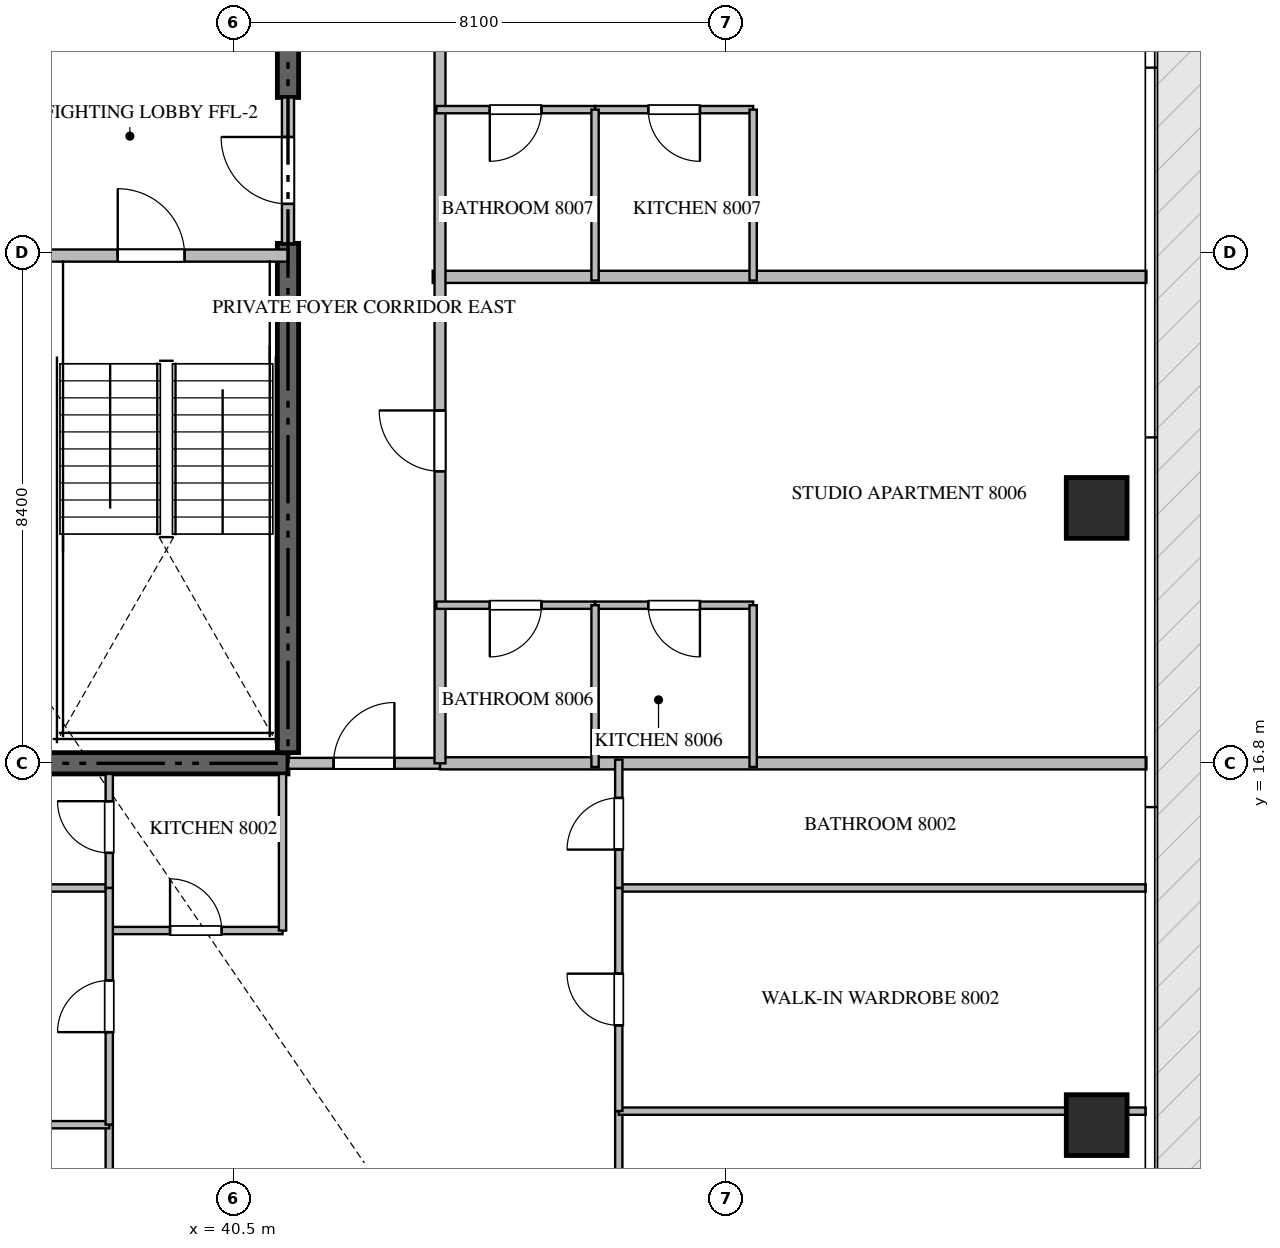
"""IFC4 building model, lengths in metres.
Left out: names, types, materials, properties, quantities, classifications, styles, units other than length and angle.
Written with IfcOpenShell. Run it as: python <this file> out.ifc"""

import sys

from ifc_helpers import new_model, si_unit, direction, frame, frame_2d, origin, origin_2d, place, context, subcontext, project, spatial, rectangle, extrude, source, transform, mapped, element, fill, save


model = new_model("IFC4")
c1 = context("Model", 3, precision=1e-05, world=origin(), true_north=direction((0.0, 1.0)))
c2 = subcontext(c1, "Body", "Model", "MODEL_VIEW")
j1 = project(units=[si_unit("LENGTHUNIT", "METRE"), si_unit("PLANEANGLEUNIT", "RADIAN")], contexts=[c1])
p1 = place(None, origin())
s1 = spatial("IfcSite", under=j1, at=p1, CompositionType="ELEMENT")
p2 = place(p1, origin())
s2 = spatial("IfcBuilding", under=s1, at=p2, CompositionType="ELEMENT")
p3 = place(p2, frame((0.0, 0.0, 321.8)))
s3 = spatial("IfcBuildingStorey", under=s2, at=p3, CompositionType="ELEMENT", Elevation=321.8)
p4 = place(p3, frame((23.4, 16.8, -0.26), z_axis=(0.0, 0.0, 1.0), x_axis=(1.0, 0.0, 0.0)))
e1 = element("IfcWall", 1, at=p4, inside=s3, PredefinedType="SHEAR", context=c2, shape_type="SweptSolid", body=[
    extrude(rectangle(XDim=18.0, YDim=0.35, at=frame_2d((9.0, 0.0))), origin(), (0.0, 0.0, 1.0), 4.048),
])
p5 = place(p3, frame((41.4, 16.975, -0.26), z_axis=(0.0, 0.0, 1.0), x_axis=(0.0, 1.0, 0.0)))
e2 = element("IfcWall", 2, at=p5, inside=s3, PredefinedType="SHEAR", context=c2, shape_type="SweptSolid", body=[
    extrude(rectangle(XDim=8.375, YDim=0.35, at=frame_2d((4.188, 0.0))), origin(), (0.0, 0.0, 1.0), 4.048),
])
p6 = place(p3, frame((41.4, 27.75, -0.26), z_axis=(0.0, 0.0, 1.0), x_axis=(0.0, 1.0, 0.0)))
e3 = element("IfcWall", 3, at=p6, inside=s3, PredefinedType="SHEAR", context=c2, shape_type="SweptSolid", body=[
    extrude(rectangle(XDim=5.675, YDim=0.35, at=frame_2d((2.837, 0.0))), origin(), (0.0, 0.0, 1.0), 4.048),
])
m1 = source(origin(), c2, "Body", "SweptSolid", [
    extrude(rectangle(XDim=1.0, YDim=1.0, at=origin_2d()), origin(), (0.0, 0.0, 1.0), 4.05),
])
for number, where, z_axis, x_axis in (
    (4, (54.7, 10.85, -0.26), (0.0, 0.0, 1.0), (1.0, 0.0, 0.0)),
    (5, (54.7, 21.0, -0.26), (0.0, 0.0, 1.0), (1.0, 0.0, 0.0)),
):
    element("IfcColumn", number, at=place(p3, frame(where, z_axis=z_axis, x_axis=x_axis)), inside=s3, PredefinedType="COLUMN", context=c2, shape_type="MappedRepresentation", body=[
        mapped(m1, transform((0.0, 0.0, 0.0), scale=1.0)),
    ])
p7 = place(p3, frame((36.95, 25.15, 0.0), z_axis=(0.0, 0.0, 1.0), x_axis=(1.0, 0.0, 0.0)))
e6 = element("IfcWall", 6, at=p7, inside=s3, PredefinedType="STANDARD", context=c2, shape_type="SweptSolid", body=[
    extrude(rectangle(XDim=4.45, YDim=0.2, at=frame_2d((2.225, 0.0))), origin(), (0.0, 0.0, 1.0), 3.79),
])
p8 = place(p7, frame((1.65, 0.0, 0.0)))
e7 = element("IfcOpeningElement", 7, at=p8, cuts=e6, PredefinedType="OPENING", context=c2, shape_type="SweptSolid", body=[
    extrude(rectangle(XDim=1.1, YDim=2.15, at=frame_2d((0.55, 1.075))), frame((0.0, 0.11, 0.0), z_axis=(0.0, -1.0, 0.0), x_axis=(1.0, 0.0, 0.0)), (0.0, 0.0, 1.0), 0.22),
])
p9 = place(p3, frame((41.4, 25.352, 0.0), z_axis=(0.0, 0.0, 1.0), x_axis=(0.0, 1.0, 0.0)))
e8 = element("IfcWall", 8, at=p9, inside=s3, PredefinedType="STANDARD", context=c2, shape_type="SweptSolid", body=[
    extrude(rectangle(XDim=2.396, YDim=0.2, at=frame_2d((1.198, 0.0))), origin(), (0.0, 0.0, 1.0), 3.79),
])
p10 = place(p9, frame((0.648, 0.0, 0.0)))
e9 = element("IfcOpeningElement", 9, at=p10, cuts=e8, PredefinedType="OPENING", context=c2, shape_type="SweptSolid", body=[
    extrude(rectangle(XDim=1.1, YDim=2.15, at=frame_2d((0.55, 1.075))), frame((0.0, 0.11, 0.0), z_axis=(0.0, -1.0, 0.0), x_axis=(1.0, 0.0, 0.0)), (0.0, 0.0, 1.0), 0.22),
])
p11 = place(p3, frame((43.78, 24.8, 0.0), z_axis=(0.0, 0.0, 1.0), x_axis=(1.0, 0.0, 0.0)))
e10 = element("IfcWall", 10, at=p11, inside=s3, PredefinedType="PARTITIONING", context=c2, shape_type="SweptSolid", body=[
    extrude(rectangle(XDim=11.738, YDim=0.2, at=frame_2d((5.869, 0.0))), origin(), (0.0, 0.0, 1.0), 3.79),
])
p12 = place(p3, frame((43.9, 16.8, 0.0), z_axis=(0.0, 0.0, 1.0), x_axis=(1.0, 0.0, 0.0)))
e11 = element("IfcWall", 11, at=p12, inside=s3, PredefinedType="PARTITIONING", context=c2, shape_type="SweptSolid", body=[
    extrude(rectangle(XDim=11.618, YDim=0.2, at=frame_2d((5.809, 0.0))), origin(), (0.0, 0.0, 1.0), 3.79),
])
p13 = place(p3, frame((41.402, 16.8, 0.0), z_axis=(0.0, 0.0, 1.0), x_axis=(1.0, 0.0, 0.0)))
e12 = element("IfcWall", 12, at=p13, inside=s3, PredefinedType="PARTITIONING", context=c2, shape_type="SweptSolid", body=[
    extrude(rectangle(XDim=2.496, YDim=0.18, at=frame_2d((1.248, 0.0))), origin(), (0.0, 0.0, 1.0), 3.79),
])
p14 = place(p13, frame((0.748, 0.0, 0.0)))
e13 = element("IfcOpeningElement", 13, at=p14, cuts=e12, PredefinedType="OPENING", context=c2, shape_type="SweptSolid", body=[
    extrude(rectangle(XDim=1.0, YDim=2.15, at=frame_2d((0.5, 1.075))), frame((0.0, 0.1, 0.0), z_axis=(0.0, -1.0, 0.0), x_axis=(1.0, 0.0, 0.0)), (0.0, 0.0, 1.0), 0.2),
])
p15 = place(p3, frame((43.9, 16.8, 0.0), z_axis=(0.0, 0.0, 1.0), x_axis=(0.0, 1.0, 0.0)))
e14 = element("IfcWall", 14, at=p15, inside=s3, PredefinedType="PARTITIONING", context=c2, shape_type="SweptSolid", body=[
    extrude(rectangle(XDim=16.8, YDim=0.18, at=frame_2d((8.4, 0.0))), origin(), (0.0, 0.0, 1.0), 3.79),
])
p16 = place(p15, frame((4.803, 0.0, 0.0)))
e15 = element("IfcOpeningElement", 15, at=p16, cuts=e14, PredefinedType="OPENING", context=c2, shape_type="SweptSolid", body=[
    extrude(rectangle(XDim=1.0, YDim=2.15, at=frame_2d((0.5, 1.075))), frame((0.0, 0.1, 0.0), z_axis=(0.0, -1.0, 0.0), x_axis=(1.0, 0.0, 0.0)), (0.0, 0.0, 1.0), 0.2),
])
p17 = place(p15, frame((13.225, 0.0, 0.0)))
e16 = element("IfcOpeningElement", 16, at=p17, cuts=e14, PredefinedType="OPENING", context=c2, shape_type="SweptSolid", body=[
    extrude(rectangle(XDim=1.0, YDim=2.15, at=frame_2d((0.5, 1.075))), frame((0.0, 0.1, 0.0), z_axis=(0.0, -1.0, 0.0), x_axis=(1.0, 0.0, 0.0)), (0.0, 0.0, 1.0), 0.2),
])
p18 = place(p3, frame((38.46, 14.05, 0.0), z_axis=(0.0, 0.0, 1.0), x_axis=(1.0, 0.0, 0.0)))
e17 = element("IfcWall", 17, at=p18, inside=s3, PredefinedType="PARTITIONING", context=c2, shape_type="SweptSolid", body=[
    extrude(rectangle(XDim=2.85, YDim=0.12, at=frame_2d((1.425, 0.0))), origin(), (0.0, 0.0, 1.0), 3.79),
])
p19 = place(p18, frame((1.0, 0.0, 0.0)))
e18 = element("IfcOpeningElement", 18, at=p19, cuts=e17, PredefinedType="OPENING", context=c2, shape_type="SweptSolid", body=[
    extrude(rectangle(XDim=0.85, YDim=2.1, at=frame_2d((0.425, 1.05))), frame((0.0, 0.07, 0.0), z_axis=(0.0, -1.0, 0.0), x_axis=(1.0, 0.0, 0.0)), (0.0, 0.0, 1.0), 0.14),
])
p20 = place(p3, frame((41.31, 14.05, 0.0), z_axis=(0.0, 0.0, 1.0), x_axis=(0.0, 1.0, 0.0)))
e19 = element("IfcWall", 19, at=p20, inside=s3, PredefinedType="PARTITIONING", context=c2, shape_type="SweptSolid", body=[
    extrude(rectangle(XDim=2.575, YDim=0.12, at=frame_2d((1.288, 0.0))), origin(), (0.0, 0.0, 1.0), 3.79),
])
p21 = place(p3, frame((38.46, 2.495, 0.0), z_axis=(0.0, 0.0, 1.0), x_axis=(0.0, 1.0, 0.0)))
e20 = element("IfcWall", 20, at=p21, inside=s3, PredefinedType="PARTITIONING", context=c2, shape_type="SweptSolid", body=[
    extrude(rectangle(XDim=8.362, YDim=0.12, at=frame_2d((4.181, 0.0))), origin(), (0.0, 0.0, 1.0), 3.79),
])
p22 = place(p21, frame((4.104, 0.0, 0.0)))
e21 = element("IfcOpeningElement", 21, at=p22, cuts=e20, PredefinedType="OPENING", context=c2, shape_type="SweptSolid", body=[
    extrude(rectangle(XDim=0.9, YDim=2.1, at=frame_2d((0.45, 1.05))), frame((0.0, 0.07, 0.0), z_axis=(0.0, -1.0, 0.0), x_axis=(1.0, 0.0, 0.0)), (0.0, 0.0, 1.0), 0.14),
])
p23 = place(p3, frame((33.34, 10.857, 0.0), z_axis=(0.0, 0.0, 1.0), x_axis=(1.0, 0.0, 0.0)))
e22 = element("IfcWall", 22, at=p23, inside=s3, PredefinedType="PARTITIONING", context=c2, shape_type="SweptSolid", body=[
    extrude(rectangle(XDim=5.12, YDim=0.12, at=frame_2d((2.56, 0.0))), origin(), (0.0, 0.0, 1.0), 3.372),
])
p24 = place(p3, frame((33.462, 14.75, 0.0), z_axis=(0.0, 0.0, 1.0), x_axis=(1.0, 0.0, 0.0)))
e23 = element("IfcWall", 23, at=p24, inside=s3, PredefinedType="PARTITIONING", context=c2, shape_type="SweptSolid", body=[
    extrude(rectangle(XDim=4.998, YDim=0.12, at=frame_2d((2.499, 0.0))), origin(), (0.0, 0.0, 1.0), 3.79),
])
p25 = place(p3, frame((38.46, 10.859, 0.0), z_axis=(0.0, 0.0, 1.0), x_axis=(0.0, 1.0, 0.0)))
e24 = element("IfcWall", 24, at=p25, inside=s3, PredefinedType="PARTITIONING", context=c2, shape_type="SweptSolid", body=[
    extrude(rectangle(XDim=3.891, YDim=0.12, at=frame_2d((1.946, 0.0))), origin(), (0.0, 0.0, 1.0), 3.79),
])
p26 = place(p25, frame((1.52, 0.0, 0.0)))
e25 = element("IfcOpeningElement", 25, at=p26, cuts=e24, PredefinedType="OPENING", context=c2, shape_type="SweptSolid", body=[
    extrude(rectangle(XDim=0.85, YDim=2.1, at=frame_2d((0.425, 1.05))), frame((0.0, 0.07, 0.0), z_axis=(0.0, -1.0, 0.0), x_axis=(1.0, 0.0, 0.0)), (0.0, 0.0, 1.0), 0.14),
])
p27 = place(p3, frame((38.46, 14.752, 0.0), z_axis=(0.0, 0.0, 1.0), x_axis=(0.0, 1.0, 0.0)))
e26 = element("IfcWall", 26, at=p27, inside=s3, PredefinedType="PARTITIONING", context=c2, shape_type="SweptSolid", body=[
    extrude(rectangle(XDim=1.873, YDim=0.12, at=frame_2d((0.937, 0.0))), origin(), (0.0, 0.0, 1.0), 3.79),
])
p28 = place(p27, frame((0.575, 0.0, 0.0)))
e27 = element("IfcOpeningElement", 27, at=p28, cuts=e26, PredefinedType="OPENING", context=c2, shape_type="SweptSolid", body=[
    extrude(rectangle(XDim=0.85, YDim=2.1, at=frame_2d((0.425, 1.05))), frame((0.0, 0.07, 0.0), z_axis=(0.0, -1.0, 0.0), x_axis=(1.0, 0.0, 0.0)), (0.0, 0.0, 1.0), 0.14),
])
p29 = place(p3, frame((46.84, 2.495, 0.0), z_axis=(0.0, 0.0, 1.0), x_axis=(0.0, 1.0, 0.0)))
e28 = element("IfcWall", 28, at=p29, inside=s3, PredefinedType="PARTITIONING", context=c2, shape_type="SweptSolid", body=[
    extrude(rectangle(XDim=8.585, YDim=0.12, at=frame_2d((4.292, 0.0))), origin(), (0.0, 0.0, 1.0), 3.79),
])
p30 = place(p29, frame((4.227, 0.0, 0.0)))
e29 = element("IfcOpeningElement", 29, at=p30, cuts=e28, PredefinedType="OPENING", context=c2, shape_type="SweptSolid", body=[
    extrude(rectangle(XDim=0.9, YDim=2.1, at=frame_2d((0.45, 1.05))), frame((0.0, 0.07, 0.0), z_axis=(0.0, -1.0, 0.0), x_axis=(1.0, 0.0, 0.0)), (0.0, 0.0, 1.0), 0.14),
])
p31 = place(p3, frame((46.84, 11.08, 0.0), z_axis=(0.0, 0.0, 1.0), x_axis=(1.0, 0.0, 0.0)))
e30 = element("IfcWall", 30, at=p31, inside=s3, PredefinedType="PARTITIONING", context=c2, shape_type="SweptSolid", body=[
    extrude(rectangle(XDim=8.665, YDim=0.12, at=frame_2d((4.333, 0.0))), origin(), (0.0, 0.0, 1.0), 3.372),
])
p32 = place(p3, frame((46.84, 14.75, 0.0), z_axis=(0.0, 0.0, 1.0), x_axis=(1.0, 0.0, 0.0)))
e31 = element("IfcWall", 31, at=p32, inside=s3, PredefinedType="PARTITIONING", context=c2, shape_type="SweptSolid", body=[
    extrude(rectangle(XDim=8.665, YDim=0.12, at=frame_2d((4.333, 0.0))), origin(), (0.0, 0.0, 1.0), 3.79),
])
p33 = place(p3, frame((46.84, 11.082, 0.0), z_axis=(0.0, 0.0, 1.0), x_axis=(0.0, 1.0, 0.0)))
e32 = element("IfcWall", 32, at=p33, inside=s3, PredefinedType="PARTITIONING", context=c2, shape_type="SweptSolid", body=[
    extrude(rectangle(XDim=3.668, YDim=0.12, at=frame_2d((1.834, 0.0))), origin(), (0.0, 0.0, 1.0), 3.79),
])
p34 = place(p33, frame((1.409, 0.0, 0.0)))
e33 = element("IfcOpeningElement", 33, at=p34, cuts=e32, PredefinedType="OPENING", context=c2, shape_type="SweptSolid", body=[
    extrude(rectangle(XDim=0.85, YDim=2.1, at=frame_2d((0.425, 1.05))), frame((0.0, 0.07, 0.0), z_axis=(0.0, -1.0, 0.0), x_axis=(1.0, 0.0, 0.0)), (0.0, 0.0, 1.0), 0.14),
])
p35 = place(p3, frame((46.84, 14.752, 0.0), z_axis=(0.0, 0.0, 1.0), x_axis=(0.0, 1.0, 0.0)))
e34 = element("IfcWall", 34, at=p35, inside=s3, PredefinedType="PARTITIONING", context=c2, shape_type="SweptSolid", body=[
    extrude(rectangle(XDim=2.108, YDim=0.12, at=frame_2d((1.054, 0.0))), origin(), (0.0, 0.0, 1.0), 3.79),
])
p36 = place(p35, frame((0.629, 0.0, 0.0)))
e35 = element("IfcOpeningElement", 35, at=p36, cuts=e34, PredefinedType="OPENING", context=c2, shape_type="SweptSolid", body=[
    extrude(rectangle(XDim=0.85, YDim=2.1, at=frame_2d((0.425, 1.05))), frame((0.0, 0.07, 0.0), z_axis=(0.0, -1.0, 0.0), x_axis=(1.0, 0.0, 0.0)), (0.0, 0.0, 1.0), 0.14),
])
p37 = place(p3, frame((49.05, 19.4, 0.0), z_axis=(0.0, 0.0, 1.0), x_axis=(-1.0, 0.0, 0.0)))
e36 = element("IfcWall", 36, at=p37, inside=s3, PredefinedType="PARTITIONING", context=c2, shape_type="SweptSolid", body=[
    extrude(rectangle(XDim=2.6, YDim=0.12, at=frame_2d((1.3, 0.0))), origin(), (0.0, 0.0, 1.0), 3.79),
])
p38 = place(p37, frame((0.875, 0.0, 0.0)))
e37 = element("IfcOpeningElement", 37, at=p38, cuts=e36, PredefinedType="OPENING", context=c2, shape_type="SweptSolid", body=[
    extrude(rectangle(XDim=0.85, YDim=2.1, at=frame_2d((0.425, 1.05))), frame((0.0, 0.07, 0.0), z_axis=(0.0, -1.0, 0.0), x_axis=(1.0, 0.0, 0.0)), (0.0, 0.0, 1.0), 0.14),
])
p39 = place(p3, frame((46.448, 19.4, 0.0), z_axis=(0.0, 0.0, 1.0), x_axis=(-1.0, 0.0, 0.0)))
e38 = element("IfcWall", 38, at=p39, inside=s3, PredefinedType="PARTITIONING", context=c2, shape_type="SweptSolid", body=[
    extrude(rectangle(XDim=2.608, YDim=0.12, at=frame_2d((1.304, 0.0))), origin(), (0.0, 0.0, 1.0), 3.79),
])
p40 = place(p39, frame((0.879, 0.0, 0.0)))
e39 = element("IfcOpeningElement", 39, at=p40, cuts=e38, PredefinedType="OPENING", context=c2, shape_type="SweptSolid", body=[
    extrude(rectangle(XDim=0.85, YDim=2.1, at=frame_2d((0.425, 1.05))), frame((0.0, 0.07, 0.0), z_axis=(0.0, -1.0, 0.0), x_axis=(1.0, 0.0, 0.0)), (0.0, 0.0, 1.0), 0.14),
])
for number, where, z_axis, x_axis in (
    (40, (46.45, 16.74, 0.0), (0.0, 0.0, 1.0), (0.0, 1.0, 0.0)),
    (41, (49.05, 16.74, 0.0), (0.0, 0.0, 1.0), (0.0, 1.0, 0.0)),
):
    element("IfcWall", number, at=place(p3, frame(where, z_axis=z_axis, x_axis=x_axis)), inside=s3, PredefinedType="PARTITIONING", context=c2, shape_type="SweptSolid", body=[
        extrude(rectangle(XDim=2.66, YDim=0.12, at=frame_2d((1.33, 0.0))), origin(), (0.0, 0.0, 1.0), 3.79),
    ])
p41 = place(p3, frame((49.05, 27.55, 0.0), z_axis=(0.0, 0.0, 1.0), x_axis=(-1.0, 0.0, 0.0)))
e42 = element("IfcWall", 42, at=p41, inside=s3, PredefinedType="PARTITIONING", context=c2, shape_type="SweptSolid", body=[
    extrude(rectangle(XDim=2.6, YDim=0.12, at=frame_2d((1.3, 0.0))), origin(), (0.0, 0.0, 1.0), 3.79),
])
p42 = place(p41, frame((0.875, 0.0, 0.0)))
e43 = element("IfcOpeningElement", 43, at=p42, cuts=e42, PredefinedType="OPENING", context=c2, shape_type="SweptSolid", body=[
    extrude(rectangle(XDim=0.85, YDim=2.1, at=frame_2d((0.425, 1.05))), frame((0.0, 0.07, 0.0), z_axis=(0.0, -1.0, 0.0), x_axis=(1.0, 0.0, 0.0)), (0.0, 0.0, 1.0), 0.14),
])
p43 = place(p3, frame((46.448, 27.55, 0.0), z_axis=(0.0, 0.0, 1.0), x_axis=(-1.0, 0.0, 0.0)))
e44 = element("IfcWall", 44, at=p43, inside=s3, PredefinedType="PARTITIONING", context=c2, shape_type="SweptSolid", body=[
    extrude(rectangle(XDim=2.608, YDim=0.12, at=frame_2d((1.304, 0.0))), origin(), (0.0, 0.0, 1.0), 3.79),
])
p44 = place(p43, frame((0.879, 0.0, 0.0)))
e45 = element("IfcOpeningElement", 45, at=p44, cuts=e44, PredefinedType="OPENING", context=c2, shape_type="SweptSolid", body=[
    extrude(rectangle(XDim=0.85, YDim=2.1, at=frame_2d((0.425, 1.05))), frame((0.0, 0.07, 0.0), z_axis=(0.0, -1.0, 0.0), x_axis=(1.0, 0.0, 0.0)), (0.0, 0.0, 1.0), 0.14),
])
for number, where, z_axis, x_axis in (
    (46, (46.45, 24.74, 0.0), (0.0, 0.0, 1.0), (0.0, 1.0, 0.0)),
    (47, (49.05, 24.74, 0.0), (0.0, 0.0, 1.0), (0.0, 1.0, 0.0)),
):
    element("IfcWall", number, at=place(p3, frame(where, z_axis=z_axis, x_axis=x_axis)), inside=s3, PredefinedType="PARTITIONING", context=c2, shape_type="SweptSolid", body=[
        extrude(rectangle(XDim=2.81, YDim=0.12, at=frame_2d((1.405, 0.0))), origin(), (0.0, 0.0, 1.0), 3.79),
    ])
m2 = source(origin(), c2, "Body", "SweptSolid", [
    extrude(rectangle(XDim=1.1, YDim=2.15, at=frame_2d((0.55, 1.075))), frame((0.0, 0.025, 0.0), z_axis=(0.0, -1.0, 0.0), x_axis=(1.0, 0.0, 0.0)), (0.0, 0.0, 1.0), 0.05),
])
p45 = place(p8, origin())
e48 = element("IfcDoor", 48, at=p45, inside=s3, OperationType="SINGLE_SWING_LEFT", PredefinedType="DOOR", context=c2, shape_type="MappedRepresentation", body=[
    mapped(m2, transform((0.0, 0.0, 0.0), scale=1.0)),
])
fill(e7, e48)
p46 = place(p10, origin())
e49 = element("IfcDoor", 49, at=p46, inside=s3, OperationType="SINGLE_SWING_RIGHT", PredefinedType="DOOR", context=c2, shape_type="MappedRepresentation", body=[
    mapped(m2, transform((0.0, 0.0, 0.0), scale=1.0)),
])
fill(e9, e49)
m3 = source(origin(), c2, "Body", "SweptSolid", [
    extrude(rectangle(XDim=1.0, YDim=2.15, at=frame_2d((0.5, 1.075))), frame((0.0, 0.025, 0.0), z_axis=(0.0, -1.0, 0.0), x_axis=(1.0, 0.0, 0.0)), (0.0, 0.0, 1.0), 0.05),
])
p47 = place(p14, origin())
e50 = element("IfcDoor", 50, at=p47, inside=s3, OperationType="SINGLE_SWING_RIGHT", PredefinedType="DOOR", context=c2, shape_type="MappedRepresentation", body=[
    mapped(m3, transform((0.0, 0.0, 0.0), scale=1.0)),
])
fill(e13, e50)
p48 = place(p16, origin())
e51 = element("IfcDoor", 51, at=p48, inside=s3, OperationType="SINGLE_SWING_RIGHT", PredefinedType="DOOR", context=c2, shape_type="MappedRepresentation", body=[
    mapped(m3, transform((0.0, 0.0, 0.0), scale=1.0)),
])
fill(e15, e51)
m4 = source(origin(), c2, "Body", "SweptSolid", [
    extrude(rectangle(XDim=0.85, YDim=2.1, at=frame_2d((0.425, 1.05))), frame((0.0, 0.025, 0.0), z_axis=(0.0, -1.0, 0.0), x_axis=(1.0, 0.0, 0.0)), (0.0, 0.0, 1.0), 0.05),
])
p49 = place(p19, origin())
e52 = element("IfcDoor", 52, at=p49, inside=s3, OperationType="SINGLE_SWING_LEFT", PredefinedType="DOOR", context=c2, shape_type="MappedRepresentation", body=[
    mapped(m4, transform((0.0, 0.0, 0.0), scale=1.0)),
])
fill(e18, e52)
p50 = place(p26, origin())
e53 = element("IfcDoor", 53, at=p50, inside=s3, OperationType="SINGLE_SWING_LEFT", PredefinedType="DOOR", context=c2, shape_type="MappedRepresentation", body=[
    mapped(m4, transform((0.0, 0.0, 0.0), scale=1.0)),
])
fill(e25, e53)
p51 = place(p28, origin())
e54 = element("IfcDoor", 54, at=p51, inside=s3, OperationType="SINGLE_SWING_RIGHT", PredefinedType="DOOR", context=c2, shape_type="MappedRepresentation", body=[
    mapped(m4, transform((0.0, 0.0, 0.0), scale=1.0)),
])
fill(e27, e54)
p52 = place(p34, origin())
e55 = element("IfcDoor", 55, at=p52, inside=s3, OperationType="SINGLE_SWING_RIGHT", PredefinedType="DOOR", context=c2, shape_type="MappedRepresentation", body=[
    mapped(m4, transform((0.0, 0.0, 0.0), scale=1.0)),
])
fill(e33, e55)
p53 = place(p36, origin())
e56 = element("IfcDoor", 56, at=p53, inside=s3, OperationType="SINGLE_SWING_LEFT", PredefinedType="DOOR", context=c2, shape_type="MappedRepresentation", body=[
    mapped(m4, transform((0.0, 0.0, 0.0), scale=1.0)),
])
fill(e35, e56)
p54 = place(p38, origin())
e57 = element("IfcDoor", 57, at=p54, inside=s3, OperationType="SINGLE_SWING_LEFT", PredefinedType="DOOR", context=c2, shape_type="MappedRepresentation", body=[
    mapped(m4, transform((0.0, 0.0, 0.0), scale=1.0)),
])
fill(e37, e57)
p55 = place(p40, origin())
e58 = element("IfcDoor", 58, at=p55, inside=s3, OperationType="SINGLE_SWING_RIGHT", PredefinedType="DOOR", context=c2, shape_type="MappedRepresentation", body=[
    mapped(m4, transform((0.0, 0.0, 0.0), scale=1.0)),
])
fill(e39, e58)
p56 = place(p42, origin())
e59 = element("IfcDoor", 59, at=p56, inside=s3, OperationType="SINGLE_SWING_LEFT", PredefinedType="DOOR", context=c2, shape_type="MappedRepresentation", body=[
    mapped(m4, transform((0.0, 0.0, 0.0), scale=1.0)),
])
fill(e43, e59)
p57 = place(p44, origin())
e60 = element("IfcDoor", 60, at=p57, inside=s3, OperationType="SINGLE_SWING_RIGHT", PredefinedType="DOOR", context=c2, shape_type="MappedRepresentation", body=[
    mapped(m4, transform((0.0, 0.0, 0.0), scale=1.0)),
])
fill(e45, e60)
save(model, sys.argv[1])
